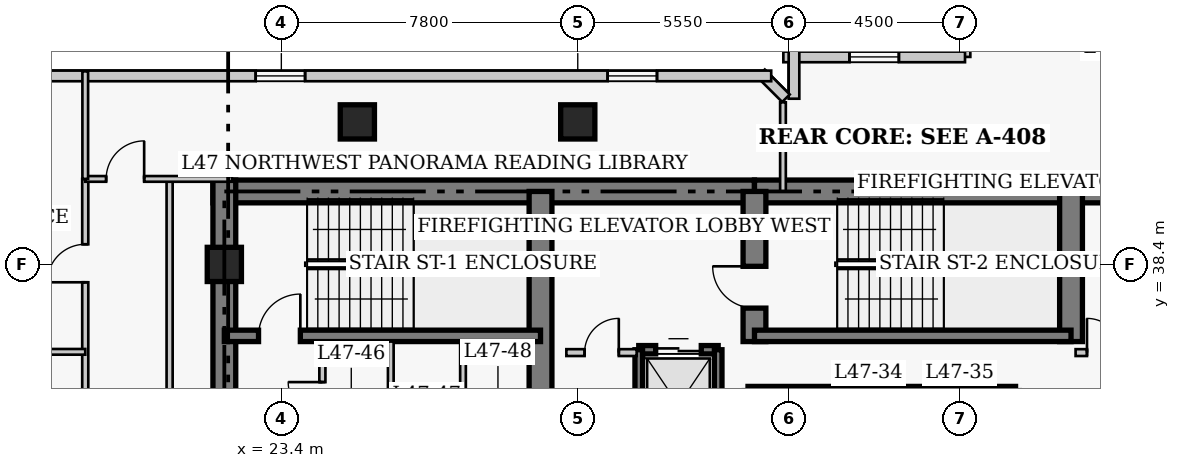
"""IFC4 building model, lengths in metres.
Left out: names, types, materials, properties, quantities, classifications, styles, units other than length and angle.
Written with IfcOpenShell. Run it as: python <this file> out.ifc"""

import sys

from ifc_helpers import new_model, si_unit, direction, frame, frame_2d, origin, origin_2d, place, context, subcontext, project, spatial, rectangle, extrude, element, fill, save


model = new_model("IFC4")
c1 = context("Model", 3, precision=1e-05, world=origin(), true_north=direction((0.0, 1.0)))
c2 = subcontext(c1, "Body", "Model", "MODEL_VIEW")
j1 = project(units=[si_unit("LENGTHUNIT", "METRE"), si_unit("PLANEANGLEUNIT", "RADIAN")], contexts=[c1])
p1 = place(None, origin())
s1 = spatial("IfcSite", under=j1, at=p1, CompositionType="ELEMENT")
p2 = place(p1, origin())
s2 = spatial("IfcBuilding", under=s1, at=p2, CompositionType="ELEMENT")
p3 = place(p2, frame((0.0, 0.0, 189.0)))
s3 = spatial("IfcBuildingStorey", under=s2, at=p3, CompositionType="ELEMENT", Elevation=189.0)
p4 = place(p3, frame((21.6, 40.32, 0.0), z_axis=(0.0, 0.0, 1.0), x_axis=(1.0, 0.0, 0.0)))
e1 = element("IfcWall", 1, at=p4, inside=s3, PredefinedType="SHEAR", context=c2, shape_type="SweptSolid", body=[
    extrude(rectangle(XDim=14.25, YDim=0.6, at=frame_2d((7.125, 0.0))), origin(), (0.0, 0.0, 1.0), 3.9),
])
p5 = place(p3, frame((35.85, 40.32, 0.0), z_axis=(0.0, 0.0, 1.0), x_axis=(1.0, 0.0, 0.0)))
e2 = element("IfcWall", 2, at=p5, inside=s3, PredefinedType="SHEAR", context=c2, shape_type="SweptSolid", body=[
    extrude(rectangle(XDim=12.6, YDim=0.6, at=frame_2d((6.3, 0.0))), origin(), (0.0, 0.0, 1.0), 3.9),
])
p6 = place(p3, frame((21.9, 27.05, 0.0), z_axis=(0.0, 0.0, 1.0), x_axis=(0.0, 1.0, 0.0)))
e3 = element("IfcWall", 3, at=p6, inside=s3, PredefinedType="SHEAR", context=c2, shape_type="SweptSolid", body=[
    extrude(rectangle(XDim=13.57, YDim=0.6, at=frame_2d((6.785, 0.0))), origin(), (0.0, 0.0, 1.0), 3.9),
])
p7 = place(p3, frame((30.22, 33.05, 0.0), z_axis=(0.0, 0.0, 1.0), x_axis=(0.0, 1.0, 0.0)))
e4 = element("IfcWall", 4, at=p7, inside=s3, PredefinedType="SHEAR", context=c2, shape_type="SweptSolid", body=[
    extrude(rectangle(XDim=7.27, YDim=0.6, at=frame_2d((3.635, 0.0))), origin(), (0.0, 0.0, 1.0), 3.9),
])
p8 = place(p3, frame((35.85, 36.37, 0.0), z_axis=(0.0, 0.0, 1.0), x_axis=(0.0, 1.0, 0.0)))
e5 = element("IfcWall", 5, at=p8, inside=s3, PredefinedType="SHEAR", context=c2, shape_type="SweptSolid", body=[
    extrude(rectangle(XDim=3.95, YDim=0.6, at=frame_2d((1.975, 0.0))), origin(), (0.0, 0.0, 1.0), 3.9),
])
p9 = place(p8, frame((0.88, 0.0, 0.0)))
e6 = element("IfcOpeningElement", 6, at=p9, cuts=e5, PredefinedType="OPENING", context=c2, shape_type="SweptSolid", body=[
    extrude(rectangle(XDim=1.1, YDim=2.15, at=frame_2d((0.55, 1.075))), frame((0.0, 0.31, 0.0), z_axis=(0.0, -1.0, 0.0), x_axis=(1.0, 0.0, 0.0)), (0.0, 0.0, 1.0), 0.62),
])
p10 = place(p3, frame((44.18, 36.37, 0.0), z_axis=(0.0, 0.0, 1.0), x_axis=(0.0, 1.0, 0.0)))
e7 = element("IfcWall", 7, at=p10, inside=s3, PredefinedType="SHEAR", context=c2, shape_type="SweptSolid", body=[
    extrude(rectangle(XDim=3.95, YDim=0.6, at=frame_2d((1.975, 0.0))), origin(), (0.0, 0.0, 1.0), 3.9),
])
p11 = place(p3, frame((21.9, 36.52, 0.0), z_axis=(0.0, 0.0, 1.0), x_axis=(1.0, 0.0, 0.0)))
e8 = element("IfcWall", 8, at=p11, inside=s3, PredefinedType="SHEAR", context=c2, shape_type="SweptSolid", body=[
    extrude(rectangle(XDim=8.32, YDim=0.3, at=frame_2d((4.16, 0.0))), origin(), (0.0, 0.0, 1.0), 3.9),
])
p12 = place(p11, frame((0.9, 0.0, 0.0)))
e9 = element("IfcOpeningElement", 9, at=p12, cuts=e8, PredefinedType="OPENING", context=c2, shape_type="SweptSolid", body=[
    extrude(rectangle(XDim=1.1, YDim=2.15, at=frame_2d((0.55, 1.075))), frame((0.0, 0.16, 0.0), z_axis=(0.0, -1.0, 0.0), x_axis=(1.0, 0.0, 0.0)), (0.0, 0.0, 1.0), 0.32),
])
p13 = place(p3, frame((35.85, 36.52, 0.0), z_axis=(0.0, 0.0, 1.0), x_axis=(1.0, 0.0, 0.0)))
e10 = element("IfcWall", 10, at=p13, inside=s3, PredefinedType="SHEAR", context=c2, shape_type="SweptSolid", body=[
    extrude(rectangle(XDim=8.33, YDim=0.3, at=frame_2d((4.165, 0.0))), origin(), (0.0, 0.0, 1.0), 3.9),
])
for number, where, z_axis, x_axis in (
    (11, (21.9, 38.4, 0.0), (0.0, 0.0, 1.0), (1.0, 0.0, 0.0)),
    (12, (25.4, 42.15, 0.0), (0.0, 0.0, 1.0), (1.0, 0.0, 0.0)),
    (13, (31.2, 42.15, 0.0), (0.0, 0.0, 1.0), (1.0, 0.0, 0.0)),
):
    element("IfcColumn", number, at=place(p3, frame(where, z_axis=z_axis, x_axis=x_axis)), inside=s3, PredefinedType="COLUMN", context=c2, shape_type="SweptSolid", body=[
        extrude(rectangle(XDim=0.9, YDim=0.9, at=origin_2d()), origin(), (0.0, 0.0, 1.0), 3.9),
    ])
p14 = place(p3, frame((41.39, 47.44, 0.0), z_axis=(0.0, 0.0, 1.0), x_axis=(0.0, -1.0, 0.0)))
e14 = element("IfcWall", 14, at=p14, inside=s3, PredefinedType="SOLIDWALL", context=c2, shape_type="SweptSolid", body=[
    extrude(rectangle(XDim=3.58, YDim=0.28, at=frame_2d((1.79, 0.0))), origin(), (0.0, 0.0, 1.0), 3.65),
])
p15 = place(p14, frame((1.14, 0.0, 0.85)))
e15 = element("IfcOpeningElement", 15, at=p15, cuts=e14, PredefinedType="OPENING", context=c2, shape_type="SweptSolid", body=[
    extrude(rectangle(XDim=1.3, YDim=1.7, at=frame_2d((0.65, 0.85))), frame((0.0, 0.15, 0.0), z_axis=(0.0, -1.0, 0.0), x_axis=(1.0, 0.0, 0.0)), (0.0, 0.0, 1.0), 0.3),
])
p16 = place(p3, frame((41.39, 43.86, 0.0), z_axis=(0.0, 0.0, 1.0), x_axis=(-1.0, 0.0, 0.0)))
e16 = element("IfcWall", 16, at=p16, inside=s3, PredefinedType="SOLIDWALL", context=c2, shape_type="SweptSolid", body=[
    extrude(rectangle(XDim=4.78, YDim=0.28, at=frame_2d((2.39, 0.0))), origin(), (0.0, 0.0, 1.0), 3.65),
])
p17 = place(p16, frame((1.74, 0.0, 0.85)))
e17 = element("IfcOpeningElement", 17, at=p17, cuts=e16, PredefinedType="OPENING", context=c2, shape_type="SweptSolid", body=[
    extrude(rectangle(XDim=1.3, YDim=1.7, at=frame_2d((0.65, 0.85))), frame((0.0, 0.15, 0.0), z_axis=(0.0, -1.0, 0.0), x_axis=(1.0, 0.0, 0.0)), (0.0, 0.0, 1.0), 0.3),
])
p18 = place(p3, frame((36.89, 44.14, 0.0), z_axis=(0.0, 0.0, 1.0), x_axis=(0.0, -1.0, 0.0)))
e18 = element("IfcWall", 18, at=p18, inside=s3, PredefinedType="SOLIDWALL", context=c2, shape_type="SweptSolid", body=[
    extrude(rectangle(XDim=1.38, YDim=0.28, at=frame_2d((0.69, 0.0))), origin(), (0.0, 0.0, 1.0), 3.65),
])
p19 = place(p3, frame((36.679, 42.773, 0.0), z_axis=(0.0, 0.0, 1.0), x_axis=(-0.707106781187, 0.707106781187, 0.0)))
e19 = element("IfcWall", 19, at=p19, inside=s3, PredefinedType="SOLIDWALL", context=c2, shape_type="SweptSolid", body=[
    extrude(rectangle(XDim=0.928, YDim=0.28, at=frame_2d((0.464, 0.0))), origin(), (0.0, 0.0, 1.0), 3.65),
])
p20 = place(p3, frame((36.29, 43.36, 0.0), z_axis=(0.0, 0.0, 1.0), x_axis=(-1.0, 0.0, 0.0)))
e20 = element("IfcWall", 20, at=p20, inside=s3, PredefinedType="SOLIDWALL", context=c2, shape_type="SweptSolid", body=[
    extrude(rectangle(XDim=25.83, YDim=0.28, at=frame_2d((12.915, 0.0))), origin(), (0.0, 0.0, 1.0), 3.65),
])
p21 = place(p20, frame((3.005, 0.0, 0.85)))
e21 = element("IfcOpeningElement", 21, at=p21, cuts=e20, PredefinedType="OPENING", context=c2, shape_type="SweptSolid", body=[
    extrude(rectangle(XDim=1.3, YDim=1.7, at=frame_2d((0.65, 0.85))), frame((0.0, 0.15, 0.0), z_axis=(0.0, -1.0, 0.0), x_axis=(1.0, 0.0, 0.0)), (0.0, 0.0, 1.0), 0.3),
])
p22 = place(p20, frame((12.265, 0.0, 0.85)))
e22 = element("IfcOpeningElement", 22, at=p22, cuts=e20, PredefinedType="OPENING", context=c2, shape_type="SweptSolid", body=[
    extrude(rectangle(XDim=1.3, YDim=1.7, at=frame_2d((0.65, 0.85))), frame((0.0, 0.15, 0.0), z_axis=(0.0, -1.0, 0.0), x_axis=(1.0, 0.0, 0.0)), (0.0, 0.0, 1.0), 0.3),
])
p23 = place(p20, frame((20.875, 0.0, 0.85)))
e23 = element("IfcOpeningElement", 23, at=p23, cuts=e20, PredefinedType="OPENING", context=c2, shape_type="SweptSolid", body=[
    extrude(rectangle(XDim=1.3, YDim=1.7, at=frame_2d((0.65, 0.85))), frame((0.0, 0.15, 0.0), z_axis=(0.0, -1.0, 0.0), x_axis=(1.0, 0.0, 0.0)), (0.0, 0.0, 1.0), 0.3),
])
p24 = place(p3, frame((35.68, 35.08, 0.0), z_axis=(0.0, 0.0, 1.0), x_axis=(1.0, 0.0, 0.0)))
e24 = element("IfcWall", 24, at=p24, inside=s3, PredefinedType="SHEAR", context=c2, shape_type="SweptSolid", body=[
    extrude(rectangle(XDim=2.32, YDim=0.22, at=frame_2d((1.16, 0.0))), origin(), (0.0, 0.0, 1.0), 3.9),
])
p25 = place(p3, frame((38.0, 35.08, 0.0), z_axis=(0.0, 0.0, 1.0), x_axis=(1.0, 0.0, 0.0)))
e25 = element("IfcWall", 25, at=p25, inside=s3, PredefinedType="SHEAR", context=c2, shape_type="SweptSolid", body=[
    extrude(rectangle(XDim=2.4, YDim=0.22, at=frame_2d((1.2, 0.0))), origin(), (0.0, 0.0, 1.0), 3.9),
])
p26 = place(p3, frame((40.4, 35.08, 0.0), z_axis=(0.0, 0.0, 1.0), x_axis=(1.0, 0.0, 0.0)))
e26 = element("IfcWall", 26, at=p26, inside=s3, PredefinedType="SHEAR", context=c2, shape_type="SweptSolid", body=[
    extrude(rectangle(XDim=2.32, YDim=0.22, at=frame_2d((1.16, 0.0))), origin(), (0.0, 0.0, 1.0), 3.9),
])
p27 = place(p3, frame((32.805, 36.155, 0.0), z_axis=(0.0, 0.0, 1.0), x_axis=(1.0, 0.0, 0.0)))
e27 = element("IfcWall", 27, at=p27, inside=s3, PredefinedType="SHEAR", context=c2, shape_type="SweptSolid", body=[
    extrude(rectangle(XDim=2.09, YDim=0.22, at=frame_2d((1.045, 0.0))), origin(), (0.0, 0.0, 1.0), 3.9),
])
p28 = place(p27, frame((0.445, 0.0, 0.0)))
e28 = element("IfcOpeningElement", 28, at=p28, cuts=e27, PredefinedType="OPENING", context=c2, shape_type="SweptSolid", body=[
    extrude(rectangle(XDim=1.2, YDim=2.15, at=frame_2d((0.6, 1.075))), frame((0.0, 0.12, 0.0), z_axis=(0.0, -1.0, 0.0), x_axis=(1.0, 0.0, 0.0)), (0.0, 0.0, 1.0), 0.24),
])
for number, where, z_axis, x_axis in (
    (29, (32.805, 33.245, 0.0), (0.0, 0.0, 1.0), (0.0, 1.0, 0.0)),
    (30, (34.895, 33.245, 0.0), (0.0, 0.0, 1.0), (0.0, 1.0, 0.0)),
):
    element("IfcWall", number, at=place(p3, frame(where, z_axis=z_axis, x_axis=x_axis)), inside=s3, PredefinedType="SHEAR", context=c2, shape_type="SweptSolid", body=[
        extrude(rectangle(XDim=2.91, YDim=0.2, at=frame_2d((1.455, 0.0))), origin(), (0.0, 0.0, 1.0), 3.9),
    ])
p29 = place(p3, frame((30.9, 36.08, 0.0), z_axis=(0.0, 0.0, 1.0), x_axis=(1.0, 0.0, 0.0)))
e31 = element("IfcWall", 31, at=p29, inside=s3, PredefinedType="PARTITIONING", context=c2, shape_type="SweptSolid", body=[
    extrude(rectangle(XDim=1.85, YDim=0.18, at=frame_2d((0.925, 0.0))), origin(), (0.0, 0.0, 1.0), 3.65),
])
p30 = place(p29, frame((0.48, 0.0, 0.0)))
e32 = element("IfcOpeningElement", 32, at=p30, cuts=e31, PredefinedType="OPENING", context=c2, shape_type="SweptSolid", body=[
    extrude(rectangle(XDim=0.9, YDim=2.15, at=frame_2d((0.45, 1.075))), frame((0.0, 0.1, 0.0), z_axis=(0.0, -1.0, 0.0), x_axis=(1.0, 0.0, 0.0)), (0.0, 0.0, 1.0), 0.2),
])
p31 = place(p3, frame((44.3, 36.08, 0.0), z_axis=(0.0, 0.0, 1.0), x_axis=(1.0, 0.0, 0.0)))
e33 = element("IfcWall", 33, at=p31, inside=s3, PredefinedType="PARTITIONING", context=c2, shape_type="SweptSolid", body=[
    extrude(rectangle(XDim=1.5, YDim=0.18, at=frame_2d((0.75, 0.0))), origin(), (0.0, 0.0, 1.0), 3.65),
])
p32 = place(p31, frame((0.3, 0.0, 0.0)))
e34 = element("IfcOpeningElement", 34, at=p32, cuts=e33, PredefinedType="OPENING", context=c2, shape_type="SweptSolid", body=[
    extrude(rectangle(XDim=0.9, YDim=2.15, at=frame_2d((0.45, 1.075))), frame((0.0, 0.1, 0.0), z_axis=(0.0, -1.0, 0.0), x_axis=(1.0, 0.0, 0.0)), (0.0, 0.0, 1.0), 0.2),
])
p33 = place(p3, frame((24.48, 32.8, 0.0), z_axis=(0.0, 0.0, 1.0), x_axis=(0.0, 1.0, 0.0)))
e35 = element("IfcWall", 35, at=p33, inside=s3, PredefinedType="PARTITIONING", context=c2, shape_type="SweptSolid", body=[
    extrude(rectangle(XDim=3.57, YDim=0.16, at=frame_2d((1.785, 0.0))), origin(), (0.0, 0.0, 1.0), 3.65),
])
p34 = place(p33, frame((1.604, 0.0, 0.0)))
e36 = element("IfcOpeningElement", 36, at=p34, cuts=e35, PredefinedType="OPENING", context=c2, shape_type="SweptSolid", body=[
    extrude(rectangle(XDim=0.9, YDim=2.1, at=frame_2d((0.45, 1.05))), frame((0.0, 0.09, 0.0), z_axis=(0.0, -1.0, 0.0), x_axis=(1.0, 0.0, 0.0)), (0.0, 0.0, 1.0), 0.18),
])
for number, where, z_axis, x_axis in (
    (37, (26.28, 32.75, 0.0), (0.0, 0.0, 1.0), (0.0, 1.0, 0.0)),
    (38, (28.18, 32.75, 0.0), (0.0, 0.0, 1.0), (0.0, 1.0, 0.0)),
):
    element("IfcWall", number, at=place(p3, frame(where, z_axis=z_axis, x_axis=x_axis)), inside=s3, PredefinedType="PARTITIONING", context=c2, shape_type="SweptSolid", body=[
        extrude(rectangle(XDim=3.62, YDim=0.15, at=frame_2d((1.81, 0.0))), origin(), (0.0, 0.0, 1.0), 3.65),
    ])
p35 = place(p3, frame((18.24, 7.55, 0.0), z_axis=(0.0, 0.0, 1.0), x_axis=(0.0, 1.0, 0.0)))
e39 = element("IfcWall", 39, at=p35, inside=s3, PredefinedType="PARTITIONING", context=c2, shape_type="SweptSolid", body=[
    extrude(rectangle(XDim=33.1, YDim=0.16, at=frame_2d((16.55, 0.0))), origin(), (0.0, 0.0, 1.0), 3.65),
])
p36 = place(p35, frame((1.35, 0.0, 0.0)))
e40 = element("IfcOpeningElement", 40, at=p36, cuts=e39, PredefinedType="OPENING", context=c2, shape_type="SweptSolid", body=[
    extrude(rectangle(XDim=0.95, YDim=2.1, at=frame_2d((0.475, 1.05))), frame((0.0, 0.09, 0.0), z_axis=(0.0, -1.0, 0.0), x_axis=(1.0, 0.0, 0.0)), (0.0, 0.0, 1.0), 0.18),
])
p37 = place(p35, frame((7.575, 0.0, 0.0)))
e41 = element("IfcOpeningElement", 41, at=p37, cuts=e39, PredefinedType="OPENING", context=c2, shape_type="SweptSolid", body=[
    extrude(rectangle(XDim=0.95, YDim=2.1, at=frame_2d((0.475, 1.05))), frame((0.0, 0.09, 0.0), z_axis=(0.0, -1.0, 0.0), x_axis=(1.0, 0.0, 0.0)), (0.0, 0.0, 1.0), 0.18),
])
p38 = place(p35, frame((20.025, 0.0, 0.0)))
e42 = element("IfcOpeningElement", 42, at=p38, cuts=e39, PredefinedType="OPENING", context=c2, shape_type="SweptSolid", body=[
    extrude(rectangle(XDim=0.95, YDim=2.1, at=frame_2d((0.475, 1.05))), frame((0.0, 0.09, 0.0), z_axis=(0.0, -1.0, 0.0), x_axis=(1.0, 0.0, 0.0)), (0.0, 0.0, 1.0), 0.18),
])
p39 = place(p35, frame((30.38, 0.0, 0.0)))
e43 = element("IfcOpeningElement", 43, at=p39, cuts=e39, PredefinedType="OPENING", context=c2, shape_type="SweptSolid", body=[
    extrude(rectangle(XDim=1.0, YDim=2.15, at=frame_2d((0.5, 1.075))), frame((0.0, 0.09, 0.0), z_axis=(0.0, -1.0, 0.0), x_axis=(1.0, 0.0, 0.0)), (0.0, 0.0, 1.0), 0.18),
])
p40 = place(p3, frame((20.46, 35.02, 0.0), z_axis=(0.0, 0.0, 1.0), x_axis=(0.0, 1.0, 0.0)))
e44 = element("IfcWall", 44, at=p40, inside=s3, PredefinedType="PARTITIONING", context=c2, shape_type="SweptSolid", body=[
    extrude(rectangle(XDim=5.63, YDim=0.16, at=frame_2d((2.815, 0.0))), origin(), (0.0, 0.0, 1.0), 3.65),
])
p41 = place(p3, frame((18.24, 40.65, 0.0), z_axis=(0.0, 0.0, 1.0), x_axis=(1.0, 0.0, 0.0)))
e45 = element("IfcWall", 45, at=p41, inside=s3, PredefinedType="PARTITIONING", context=c2, shape_type="SweptSolid", body=[
    extrude(rectangle(XDim=3.86, YDim=0.15, at=frame_2d((1.93, 0.0))), origin(), (0.0, 0.0, 1.0), 3.65),
])
p42 = place(p41, frame((0.55, 0.0, 0.0)))
e46 = element("IfcOpeningElement", 46, at=p42, cuts=e45, PredefinedType="OPENING", context=c2, shape_type="SweptSolid", body=[
    extrude(rectangle(XDim=1.0, YDim=2.15, at=frame_2d((0.5, 1.075))), frame((0.0, 0.085, 0.0), z_axis=(0.0, -1.0, 0.0), x_axis=(1.0, 0.0, 0.0)), (0.0, 0.0, 1.0), 0.17),
])
p43 = place(p3, frame((18.24, 40.65, 0.0), z_axis=(0.0, 0.0, 1.0), x_axis=(0.0, 1.0, 0.0)))
e47 = element("IfcWall", 47, at=p43, inside=s3, PredefinedType="PARTITIONING", context=c2, shape_type="SweptSolid", body=[
    extrude(rectangle(XDim=2.83, YDim=0.15, at=frame_2d((1.415, 0.0))), origin(), (0.0, 0.0, 1.0), 3.65),
])
p44 = place(p3, frame((36.6, 40.32, 0.0), z_axis=(0.0, 0.0, 1.0), x_axis=(0.0, 1.0, 0.0)))
e48 = element("IfcWall", 48, at=p44, inside=s3, PredefinedType="PARTITIONING", context=c2, shape_type="SweptSolid", body=[
    extrude(rectangle(XDim=2.345, YDim=0.15, at=frame_2d((1.172, 0.0))), origin(), (0.0, 0.0, 1.0), 3.65),
])
p45 = place(p3, frame((14.45, 36.1, 0.0), z_axis=(0.0, 0.0, 1.0), x_axis=(1.0, 0.0, 0.0)))
e49 = element("IfcWall", 49, at=p45, inside=s3, PredefinedType="PARTITIONING", context=c2, shape_type="SweptSolid", body=[
    extrude(rectangle(XDim=3.79, YDim=0.15, at=frame_2d((1.895, 0.0))), origin(), (0.0, 0.0, 1.0), 3.65),
])
p46 = place(p17, origin())
e50 = element("IfcWindow", 50, at=p46, inside=s3, PartitioningType="SINGLE_PANEL", PredefinedType="WINDOW", context=c2, shape_type="SweptSolid", body=[
    extrude(rectangle(XDim=1.3, YDim=1.7, at=frame_2d((0.65, 0.85))), frame((0.0, 0.03, 0.0), z_axis=(0.0, -1.0, 0.0), x_axis=(1.0, 0.0, 0.0)), (0.0, 0.0, 1.0), 0.06),
])
fill(e17, e50)
p47 = place(p21, origin())
e51 = element("IfcWindow", 51, at=p47, inside=s3, PartitioningType="SINGLE_PANEL", PredefinedType="WINDOW", context=c2, shape_type="SweptSolid", body=[
    extrude(rectangle(XDim=1.3, YDim=1.7, at=frame_2d((0.65, 0.85))), frame((0.0, 0.03, 0.0), z_axis=(0.0, -1.0, 0.0), x_axis=(1.0, 0.0, 0.0)), (0.0, 0.0, 1.0), 0.06),
])
fill(e21, e51)
p48 = place(p22, origin())
e52 = element("IfcWindow", 52, at=p48, inside=s3, PartitioningType="SINGLE_PANEL", PredefinedType="WINDOW", context=c2, shape_type="SweptSolid", body=[
    extrude(rectangle(XDim=1.3, YDim=1.7, at=frame_2d((0.65, 0.85))), frame((0.0, 0.03, 0.0), z_axis=(0.0, -1.0, 0.0), x_axis=(1.0, 0.0, 0.0)), (0.0, 0.0, 1.0), 0.06),
])
fill(e22, e52)
p49 = place(p28, origin())
e53 = element("IfcDoor", 53, at=p49, inside=s3, OperationType="DOUBLE_DOOR_SLIDING", PredefinedType="DOOR", context=c2, shape_type="SweptSolid", body=[
    extrude(rectangle(XDim=1.2, YDim=2.15, at=frame_2d((0.6, 1.075))), frame((0.0, 0.025, 0.0), z_axis=(0.0, -1.0, 0.0), x_axis=(1.0, 0.0, 0.0)), (0.0, 0.0, 1.0), 0.05),
])
fill(e28, e53)
p50 = place(p30, origin())
e54 = element("IfcDoor", 54, at=p50, inside=s3, OperationType="SINGLE_SWING_RIGHT", PredefinedType="DOOR", context=c2, shape_type="SweptSolid", body=[
    extrude(rectangle(XDim=0.9, YDim=2.15, at=frame_2d((0.45, 1.075))), frame((0.0, 0.025, 0.0), z_axis=(0.0, -1.0, 0.0), x_axis=(1.0, 0.0, 0.0)), (0.0, 0.0, 1.0), 0.05),
])
fill(e32, e54)
p51 = place(p32, origin())
e55 = element("IfcDoor", 55, at=p51, inside=s3, OperationType="SINGLE_SWING_LEFT", PredefinedType="DOOR", context=c2, shape_type="SweptSolid", body=[
    extrude(rectangle(XDim=0.9, YDim=2.15, at=frame_2d((0.45, 1.075))), frame((0.0, 0.025, 0.0), z_axis=(0.0, -1.0, 0.0), x_axis=(1.0, 0.0, 0.0)), (0.0, 0.0, 1.0), 0.05),
])
fill(e34, e55)
p52 = place(p34, origin())
e56 = element("IfcDoor", 56, at=p52, inside=s3, OperationType="SINGLE_SWING_RIGHT", PredefinedType="DOOR", context=c2, shape_type="SweptSolid", body=[
    extrude(rectangle(XDim=0.9, YDim=2.1, at=frame_2d((0.45, 1.05))), frame((0.0, 0.025, 0.0), z_axis=(0.0, -1.0, 0.0), x_axis=(1.0, 0.0, 0.0)), (0.0, 0.0, 1.0), 0.05),
])
fill(e36, e56)
p53 = place(p42, origin())
e57 = element("IfcDoor", 57, at=p53, inside=s3, OperationType="SINGLE_SWING_RIGHT", PredefinedType="DOOR", context=c2, shape_type="SweptSolid", body=[
    extrude(rectangle(XDim=1.0, YDim=2.15, at=frame_2d((0.5, 1.075))), frame((0.0, 0.025, 0.0), z_axis=(0.0, -1.0, 0.0), x_axis=(1.0, 0.0, 0.0)), (0.0, 0.0, 1.0), 0.05),
])
fill(e46, e57)
p54 = place(p39, origin())
e58 = element("IfcDoor", 58, at=p54, inside=s3, OperationType="SINGLE_SWING_LEFT", PredefinedType="DOOR", context=c2, shape_type="SweptSolid", body=[
    extrude(rectangle(XDim=1.0, YDim=2.15, at=frame_2d((0.5, 1.075))), frame((0.0, 0.025, 0.0), z_axis=(0.0, -1.0, 0.0), x_axis=(1.0, 0.0, 0.0)), (0.0, 0.0, 1.0), 0.05),
])
fill(e43, e58)
p55 = place(p12, origin())
e59 = element("IfcDoor", 59, at=p55, inside=s3, OperationType="SINGLE_SWING_RIGHT", PredefinedType="DOOR", context=c2, shape_type="SweptSolid", body=[
    extrude(rectangle(XDim=1.1, YDim=2.15, at=frame_2d((0.55, 1.075))), frame((0.0, 0.025, 0.0), z_axis=(0.0, -1.0, 0.0), x_axis=(1.0, 0.0, 0.0)), (0.0, 0.0, 1.0), 0.05),
])
fill(e9, e59)
p56 = place(p9, origin())
e60 = element("IfcDoor", 60, at=p56, inside=s3, OperationType="SINGLE_SWING_RIGHT", PredefinedType="DOOR", context=c2, shape_type="SweptSolid", body=[
    extrude(rectangle(XDim=1.1, YDim=2.15, at=frame_2d((0.55, 1.075))), frame((0.0, 0.025, 0.0), z_axis=(0.0, -1.0, 0.0), x_axis=(1.0, 0.0, 0.0)), (0.0, 0.0, 1.0), 0.05),
])
fill(e6, e60)
save(model, sys.argv[1])
